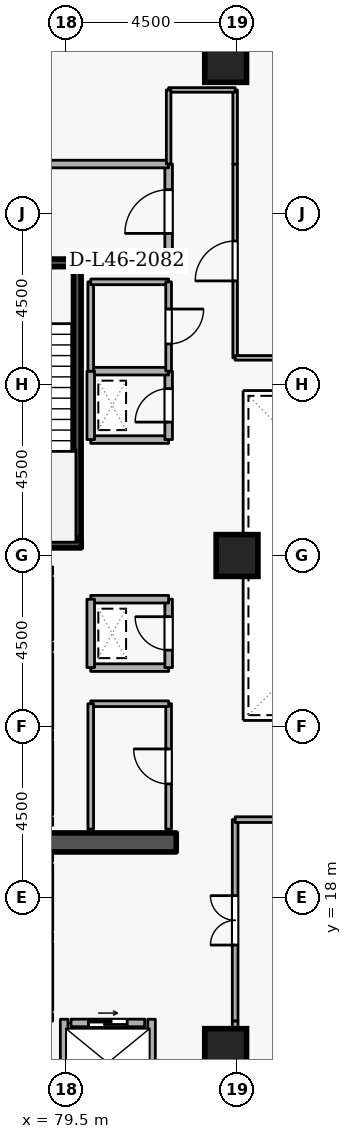
"""IFC4 building model, lengths in metres.
Left out: names, types, materials, properties, quantities, classifications, styles, units other than length and angle.
Written with IfcOpenShell. Run it as: python <this file> out.ifc"""

import sys

from ifc_helpers import new_model, si_unit, direction, frame, frame_2d, origin, origin_2d, place, context, subcontext, project, spatial, rectangle, extrude, element, fill, save


model = new_model("IFC4")
c1 = context("Model", 3, precision=1e-05, world=origin(), true_north=direction((0.0, 1.0)))
c2 = subcontext(c1, "Body", "Model", "MODEL_VIEW")
j1 = project(units=[si_unit("LENGTHUNIT", "METRE"), si_unit("PLANEANGLEUNIT", "RADIAN")], contexts=[c1])
p1 = place(None, origin())
s1 = spatial("IfcSite", under=j1, at=p1, CompositionType="ELEMENT")
p2 = place(p1, origin())
s2 = spatial("IfcBuilding", under=s1, at=p2, CompositionType="ELEMENT")
p3 = place(p2, frame((0.0, 0.0, 174.3)))
s3 = spatial("IfcBuildingStorey", under=s2, at=p3, CompositionType="ELEMENT", Elevation=174.3)
p4 = place(p3, frame((76.6, 19.45, 0.0), z_axis=(0.0, 0.0, 1.0), x_axis=(1.0, 0.0, 0.0)))
e1 = element("IfcWall", 1, at=p4, inside=s3, PredefinedType="SHEAR", context=c2, shape_type="SweptSolid", body=[
    extrude(rectangle(XDim=5.8, YDim=0.5, at=frame_2d((2.9, 0.0))), origin(), (0.0, 0.0, 1.0), 4.2),
])
for number, where, z_axis, x_axis in (
    (2, (83.7, 14.0, 0.0), (0.0, 0.0, 1.0), (1.0, 0.0, 0.0)),
    (3, (83.7, 40.0, 0.0), (0.0, 0.0, 1.0), (1.0, 0.0, 0.0)),
    (4, (84.0, 27.0, 0.0), (0.0, 0.0, 1.0), (1.0, 0.0, 0.0)),
):
    element("IfcColumn", number, at=place(p3, frame(where, z_axis=z_axis, x_axis=x_axis)), inside=s3, PredefinedType="COLUMN", context=c2, shape_type="SweptSolid", body=[
        extrude(rectangle(XDim=1.1, YDim=1.1, at=origin_2d()), origin(), (0.0, 0.0, 1.0), 4.2),
    ])
p5 = place(p3, frame((79.05, 24.78, 0.0), z_axis=(0.0, 0.0, 1.0), x_axis=(0.0, 1.0, 0.0)))
e5 = element("IfcWall", 5, at=p5, inside=s3, PredefinedType="STANDARD", context=c2, shape_type="SweptSolid", body=[
    extrude(rectangle(XDim=1.64, YDim=0.2, at=frame_2d((0.82, 0.0))), origin(), (0.0, 0.0, 1.0), 3.94),
])
p6 = place(p5, frame((0.31, 0.0, 0.0)))
e6 = element("IfcOpeningElement", 6, at=p6, cuts=e5, PredefinedType="OPENING", context=c2, shape_type="SweptSolid", body=[
    extrude(rectangle(XDim=1.02, YDim=2.06, at=frame_2d((0.51, 1.03))), frame((0.0, 0.11, 0.0), z_axis=(0.0, -1.0, 0.0), x_axis=(1.0, 0.0, 0.0)), (0.0, 0.0, 1.0), 0.22),
])
p7 = place(p3, frame((79.05, 22.43, 0.0), z_axis=(0.0, 0.0, 1.0), x_axis=(0.0, 1.0, 0.0)))
e7 = element("IfcWall", 7, at=p7, inside=s3, PredefinedType="STANDARD", context=c2, shape_type="SweptSolid", body=[
    extrude(rectangle(XDim=1.99, YDim=0.2, at=frame_2d((0.995, 0.0))), origin(), (0.0, 0.0, 1.0), 3.94),
])
p8 = place(p7, frame((0.485, 0.0, 0.0)))
e8 = element("IfcOpeningElement", 8, at=p8, cuts=e7, PredefinedType="OPENING", context=c2, shape_type="SweptSolid", body=[
    extrude(rectangle(XDim=1.02, YDim=2.06, at=frame_2d((0.51, 1.03))), frame((0.0, 0.11, 0.0), z_axis=(0.0, -1.0, 0.0), x_axis=(1.0, 0.0, 0.0)), (0.0, 0.0, 1.0), 0.22),
])
p9 = place(p3, frame((79.05, 20.18, 0.0), z_axis=(0.0, 0.0, 1.0), x_axis=(0.0, 1.0, 0.0)))
e9 = element("IfcWall", 9, at=p9, inside=s3, PredefinedType="STANDARD", context=c2, shape_type="SweptSolid", body=[
    extrude(rectangle(XDim=1.94, YDim=0.2, at=frame_2d((0.97, 0.0))), origin(), (0.0, 0.0, 1.0), 3.94),
])
p10 = place(p9, frame((0.46, 0.0, 0.0)))
e10 = element("IfcOpeningElement", 10, at=p10, cuts=e9, PredefinedType="OPENING", context=c2, shape_type="SweptSolid", body=[
    extrude(rectangle(XDim=1.02, YDim=2.06, at=frame_2d((0.51, 1.03))), frame((0.0, 0.11, 0.0), z_axis=(0.0, -1.0, 0.0), x_axis=(1.0, 0.0, 0.0)), (0.0, 0.0, 1.0), 0.22),
])
p11 = place(p3, frame((79.05, 17.13, 0.0), z_axis=(0.0, 0.0, 1.0), x_axis=(0.0, 1.0, 0.0)))
e11 = element("IfcWall", 11, at=p11, inside=s3, PredefinedType="STANDARD", context=c2, shape_type="SweptSolid", body=[
    extrude(rectangle(XDim=1.74, YDim=0.2, at=frame_2d((0.87, 0.0))), origin(), (0.0, 0.0, 1.0), 3.94),
])
p12 = place(p11, frame((0.36, 0.0, 0.0)))
e12 = element("IfcOpeningElement", 12, at=p12, cuts=e11, PredefinedType="OPENING", context=c2, shape_type="SweptSolid", body=[
    extrude(rectangle(XDim=1.02, YDim=2.06, at=frame_2d((0.51, 1.03))), frame((0.0, 0.11, 0.0), z_axis=(0.0, -1.0, 0.0), x_axis=(1.0, 0.0, 0.0)), (0.0, 0.0, 1.0), 0.22),
])
p13 = place(p3, frame((79.05, 15.03, 0.0), z_axis=(0.0, 0.0, 1.0), x_axis=(0.0, 1.0, 0.0)))
e13 = element("IfcWall", 13, at=p13, inside=s3, PredefinedType="STANDARD", context=c2, shape_type="SweptSolid", body=[
    extrude(rectangle(XDim=1.79, YDim=0.2, at=frame_2d((0.895, 0.0))), origin(), (0.0, 0.0, 1.0), 3.94),
])
p14 = place(p13, frame((0.385, 0.0, 0.0)))
e14 = element("IfcOpeningElement", 14, at=p14, cuts=e13, PredefinedType="OPENING", context=c2, shape_type="SweptSolid", body=[
    extrude(rectangle(XDim=1.02, YDim=2.06, at=frame_2d((0.51, 1.03))), frame((0.0, 0.11, 0.0), z_axis=(0.0, -1.0, 0.0), x_axis=(1.0, 0.0, 0.0)), (0.0, 0.0, 1.0), 0.22),
])
p15 = place(p3, frame((79.63, 14.7, 0.0), z_axis=(0.0, 0.0, 1.0), x_axis=(1.0, 0.0, 0.0)))
e15 = element("IfcWall", 15, at=p15, inside=s3, PredefinedType="STANDARD", context=c2, shape_type="SweptSolid", body=[
    extrude(rectangle(XDim=1.94, YDim=0.2, at=frame_2d((0.97, 0.0))), origin(), (0.0, 0.0, 1.0), 3.94),
])
p16 = place(p15, frame((0.46, 0.0, 0.0)))
e16 = element("IfcOpeningElement", 16, at=p16, cuts=e15, PredefinedType="OPENING", context=c2, shape_type="SweptSolid", body=[
    extrude(rectangle(XDim=1.02, YDim=2.06, at=frame_2d((0.51, 1.03))), frame((0.0, 0.11, 0.0), z_axis=(0.0, -1.0, 0.0), x_axis=(1.0, 0.0, 0.0)), (0.0, 0.0, 1.0), 0.22),
])
for number, where, z_axis, x_axis in (
    (17, (81.75, 12.612, 0.0), (0.0, 0.0, 1.0), (0.0, 1.0, 0.0)),
    (18, (79.45, 12.612, 0.0), (0.0, 0.0, 1.0), (0.0, 1.0, 0.0)),
):
    element("IfcWall", number, at=place(p3, frame(where, z_axis=z_axis, x_axis=x_axis)), inside=s3, PredefinedType="STANDARD", context=c2, shape_type="SweptSolid", body=[
        extrude(rectangle(XDim=2.186, YDim=0.2, at=frame_2d((1.093, 0.0))), origin(), (0.0, 0.0, 1.0), 3.94),
    ])
p17 = place(p3, frame((76.55, 34.7, 0.0), z_axis=(0.0, 0.0, 1.0), x_axis=(1.0, 0.0, 0.0)))
e19 = element("IfcWall", 19, at=p17, inside=s3, PredefinedType="SHEAR", context=c2, shape_type="SweptSolid", body=[
    extrude(rectangle(XDim=3.35, YDim=0.2, at=frame_2d((1.675, 0.0))), origin(), (0.0, 0.0, 1.0), 4.2),
])
p18 = place(p17, frame((1.125, 0.0, 0.0)))
e20 = element("IfcOpeningElement", 20, at=p18, cuts=e19, PredefinedType="OPENING", context=c2, shape_type="SweptSolid", body=[
    extrude(rectangle(XDim=1.1, YDim=2.1, at=frame_2d((0.55, 1.05))), frame((0.0, 0.11, 0.0), z_axis=(0.0, -1.0, 0.0), x_axis=(1.0, 0.0, 0.0)), (0.0, 0.0, 1.0), 0.22),
])
p19 = place(p3, frame((79.9, 27.3, 0.0), z_axis=(0.0, 0.0, 1.0), x_axis=(-1.0, 0.0, 0.0)))
e21 = element("IfcWall", 21, at=p19, inside=s3, PredefinedType="SHEAR", context=c2, shape_type="SweptSolid", body=[
    extrude(rectangle(XDim=3.35, YDim=0.2, at=frame_2d((1.675, 0.0))), origin(), (0.0, 0.0, 1.0), 4.2),
])
p20 = place(p3, frame((79.797, 27.45, 0.0), z_axis=(0.0, 0.0, 1.0), x_axis=(0.0, 1.0, 0.0)))
e22 = element("IfcWall", 22, at=p20, inside=s3, PredefinedType="SHEAR", context=c2, shape_type="SweptSolid", body=[
    extrude(rectangle(XDim=7.1, YDim=0.2, at=frame_2d((3.55, 0.0))), origin(), (0.0, 0.0, 1.0), 4.2),
])
p21 = place(p3, frame((79.9, 34.8, 0.0), z_axis=(0.0, 0.0, 1.0), x_axis=(1.0, 0.0, 0.0)))
e23 = element("IfcWall", 23, at=p21, inside=s3, PredefinedType="STANDARD", context=c2, shape_type="SweptSolid", body=[
    extrude(rectangle(XDim=2.3, YDim=0.2, at=frame_2d((1.15, 0.0))), origin(), (0.0, 0.0, 1.0), 3.145),
])
p22 = place(p3, frame((82.2, 34.8, 0.0), z_axis=(0.0, 0.0, 1.0), x_axis=(0.0, 1.0, 0.0)))
e24 = element("IfcWall", 24, at=p22, inside=s3, PredefinedType="STANDARD", context=c2, shape_type="SweptSolid", body=[
    extrude(rectangle(XDim=2.5, YDim=0.2, at=frame_2d((1.25, 0.0))), origin(), (0.0, 0.0, 1.0), 3.94),
])
p23 = place(p22, frame((0.675, 0.0, 0.0)))
e25 = element("IfcOpeningElement", 25, at=p23, cuts=e24, PredefinedType="OPENING", context=c2, shape_type="SweptSolid", body=[
    extrude(rectangle(XDim=1.15, YDim=2.1, at=frame_2d((0.575, 1.05))), frame((0.0, 0.11, 0.0), z_axis=(0.0, -1.0, 0.0), x_axis=(1.0, 0.0, 0.0)), (0.0, 0.0, 1.0), 0.22),
])
p24 = place(p3, frame((82.2, 37.3, 0.0), z_axis=(0.0, 0.0, 1.0), x_axis=(-1.0, 0.0, 0.0)))
e26 = element("IfcWall", 26, at=p24, inside=s3, PredefinedType="STANDARD", context=c2, shape_type="SweptSolid", body=[
    extrude(rectangle(XDim=5.7, YDim=0.2, at=frame_2d((2.85, 0.0))), origin(), (0.0, 0.0, 1.0), 3.94),
])
p25 = place(p3, frame((80.15, 24.05, 0.0), z_axis=(0.0, 0.0, 1.0), x_axis=(1.0, 0.0, 0.0)))
e27 = element("IfcWall", 27, at=p25, inside=s3, PredefinedType="STANDARD", context=c2, shape_type="SweptSolid", body=[
    extrude(rectangle(XDim=2.05, YDim=0.2, at=frame_2d((1.025, 0.0))), origin(), (0.0, 0.0, 1.0), 3.94),
])
p26 = place(p3, frame((82.2, 24.05, 0.0), z_axis=(0.0, 0.0, 1.0), x_axis=(0.0, 1.0, 0.0)))
e28 = element("IfcWall", 28, at=p26, inside=s3, PredefinedType="STANDARD", context=c2, shape_type="SweptSolid", body=[
    extrude(rectangle(XDim=1.8, YDim=0.2, at=frame_2d((0.9, 0.0))), origin(), (0.0, 0.0, 1.0), 3.94),
])
p27 = place(p26, frame((0.46, 0.0, 0.0)))
e29 = element("IfcOpeningElement", 29, at=p27, cuts=e28, PredefinedType="OPENING", context=c2, shape_type="SweptSolid", body=[
    extrude(rectangle(XDim=0.88, YDim=2.04, at=frame_2d((0.44, 1.02))), frame((0.0, 0.11, 0.0), z_axis=(0.0, -1.0, 0.0), x_axis=(1.0, 0.0, 0.0)), (0.0, 0.0, 1.0), 0.22),
])
p28 = place(p3, frame((82.2, 25.85, 0.0), z_axis=(0.0, 0.0, 1.0), x_axis=(-1.0, 0.0, 0.0)))
e30 = element("IfcWall", 30, at=p28, inside=s3, PredefinedType="STANDARD", context=c2, shape_type="SweptSolid", body=[
    extrude(rectangle(XDim=2.05, YDim=0.2, at=frame_2d((1.025, 0.0))), origin(), (0.0, 0.0, 1.0), 3.94),
])
p29 = place(p3, frame((80.15, 25.85, 0.0), z_axis=(0.0, 0.0, 1.0), x_axis=(0.0, -1.0, 0.0)))
e31 = element("IfcWall", 31, at=p29, inside=s3, PredefinedType="STANDARD", context=c2, shape_type="SweptSolid", body=[
    extrude(rectangle(XDim=1.8, YDim=0.2, at=frame_2d((0.9, 0.0))), origin(), (0.0, 0.0, 1.0), 3.94),
])
p30 = place(p3, frame((80.15, 30.05, 0.0), z_axis=(0.0, 0.0, 1.0), x_axis=(1.0, 0.0, 0.0)))
e32 = element("IfcWall", 32, at=p30, inside=s3, PredefinedType="STANDARD", context=c2, shape_type="SweptSolid", body=[
    extrude(rectangle(XDim=2.05, YDim=0.2, at=frame_2d((1.025, 0.0))), origin(), (0.0, 0.0, 1.0), 3.94),
])
p31 = place(p3, frame((82.2, 30.05, 0.0), z_axis=(0.0, 0.0, 1.0), x_axis=(0.0, 1.0, 0.0)))
e33 = element("IfcWall", 33, at=p31, inside=s3, PredefinedType="STANDARD", context=c2, shape_type="SweptSolid", body=[
    extrude(rectangle(XDim=1.8, YDim=0.2, at=frame_2d((0.9, 0.0))), origin(), (0.0, 0.0, 1.0), 3.94),
])
p32 = place(p31, frame((0.46, 0.0, 0.0)))
e34 = element("IfcOpeningElement", 34, at=p32, cuts=e33, PredefinedType="OPENING", context=c2, shape_type="SweptSolid", body=[
    extrude(rectangle(XDim=0.88, YDim=2.04, at=frame_2d((0.44, 1.02))), frame((0.0, 0.11, 0.0), z_axis=(0.0, -1.0, 0.0), x_axis=(1.0, 0.0, 0.0)), (0.0, 0.0, 1.0), 0.22),
])
p33 = place(p3, frame((82.2, 31.85, 0.0), z_axis=(0.0, 0.0, 1.0), x_axis=(-1.0, 0.0, 0.0)))
e35 = element("IfcWall", 35, at=p33, inside=s3, PredefinedType="STANDARD", context=c2, shape_type="SweptSolid", body=[
    extrude(rectangle(XDim=2.05, YDim=0.2, at=frame_2d((1.025, 0.0))), origin(), (0.0, 0.0, 1.0), 3.94),
])
p34 = place(p3, frame((80.15, 31.85, 0.0), z_axis=(0.0, 0.0, 1.0), x_axis=(0.0, -1.0, 0.0)))
e36 = element("IfcWall", 36, at=p34, inside=s3, PredefinedType="STANDARD", context=c2, shape_type="SweptSolid", body=[
    extrude(rectangle(XDim=1.8, YDim=0.2, at=frame_2d((0.9, 0.0))), origin(), (0.0, 0.0, 1.0), 3.94),
])
p35 = place(p3, frame((82.2, 19.8, 0.0), z_axis=(0.0, 0.0, 1.0), x_axis=(0.0, 1.0, 0.0)))
e37 = element("IfcWall", 37, at=p35, inside=s3, PredefinedType="PARTITIONING", context=c2, shape_type="SweptSolid", body=[
    extrude(rectangle(XDim=3.3, YDim=0.15, at=frame_2d((1.65, 0.0))), origin(), (0.0, 0.0, 1.0), 3.94),
])
p36 = place(p35, frame((1.19, 0.0, 0.0)))
e38 = element("IfcOpeningElement", 38, at=p36, cuts=e37, PredefinedType="OPENING", context=c2, shape_type="SweptSolid", body=[
    extrude(rectangle(XDim=0.92, YDim=2.08, at=frame_2d((0.46, 1.04))), frame((0.0, 0.085, 0.0), z_axis=(0.0, -1.0, 0.0), x_axis=(1.0, 0.0, 0.0)), (0.0, 0.0, 1.0), 0.17),
])
p37 = place(p3, frame((82.2, 23.1, 0.0), z_axis=(0.0, 0.0, 1.0), x_axis=(-1.0, 0.0, 0.0)))
e39 = element("IfcWall", 39, at=p37, inside=s3, PredefinedType="PARTITIONING", context=c2, shape_type="SweptSolid", body=[
    extrude(rectangle(XDim=2.05, YDim=0.15, at=frame_2d((1.025, 0.0))), origin(), (0.0, 0.0, 1.0), 3.94),
])
p38 = place(p3, frame((80.15, 23.1, 0.0), z_axis=(0.0, 0.0, 1.0), x_axis=(0.0, -1.0, 0.0)))
e40 = element("IfcWall", 40, at=p38, inside=s3, PredefinedType="PARTITIONING", context=c2, shape_type="SweptSolid", body=[
    extrude(rectangle(XDim=3.3, YDim=0.15, at=frame_2d((1.65, 0.0))), origin(), (0.0, 0.0, 1.0), 3.94),
])
p39 = place(p3, frame((80.15, 31.85, 0.0), z_axis=(0.0, 0.0, 1.0), x_axis=(0.0, 1.0, 0.0)))
e41 = element("IfcWall", 41, at=p39, inside=s3, PredefinedType="PARTITIONING", context=c2, shape_type="SweptSolid", body=[
    extrude(rectangle(XDim=2.35, YDim=0.15, at=frame_2d((1.175, 0.0))), origin(), (0.0, 0.0, 1.0), 3.94),
])
p40 = place(p3, frame((80.15, 34.2, 0.0), z_axis=(0.0, 0.0, 1.0), x_axis=(1.0, 0.0, 0.0)))
e42 = element("IfcWall", 42, at=p40, inside=s3, PredefinedType="PARTITIONING", context=c2, shape_type="SweptSolid", body=[
    extrude(rectangle(XDim=2.05, YDim=0.15, at=frame_2d((1.025, 0.0))), origin(), (0.0, 0.0, 1.0), 3.145),
])
p41 = place(p3, frame((82.2, 34.2, 0.0), z_axis=(0.0, 0.0, 1.0), x_axis=(0.0, -1.0, 0.0)))
e43 = element("IfcWall", 43, at=p41, inside=s3, PredefinedType="PARTITIONING", context=c2, shape_type="SweptSolid", body=[
    extrude(rectangle(XDim=2.35, YDim=0.15, at=frame_2d((1.175, 0.0))), origin(), (0.0, 0.0, 1.0), 3.94),
])
p42 = place(p41, frame((0.715, 0.0, 0.0)))
e44 = element("IfcOpeningElement", 44, at=p42, cuts=e43, PredefinedType="OPENING", context=c2, shape_type="SweptSolid", body=[
    extrude(rectangle(XDim=0.92, YDim=2.08, at=frame_2d((0.46, 1.04))), frame((0.0, 0.085, 0.0), z_axis=(0.0, -1.0, 0.0), x_axis=(1.0, 0.0, 0.0)), (0.0, 0.0, 1.0), 0.17),
])
p43 = place(p3, frame((83.95, 14.75, 0.0), z_axis=(0.0, 0.0, 1.0), x_axis=(0.0, 1.0, 0.0)))
e45 = element("IfcWall", 45, at=p43, inside=s3, PredefinedType="PARTITIONING", context=c2, shape_type="SweptSolid", body=[
    extrude(rectangle(XDim=5.3, YDim=0.15, at=frame_2d((2.65, 0.0))), origin(), (0.0, 0.0, 1.0), 3.94),
])
p44 = place(p43, frame((2.0, 0.0, 0.0)))
e46 = element("IfcOpeningElement", 46, at=p44, cuts=e45, PredefinedType="OPENING", context=c2, shape_type="SweptSolid", body=[
    extrude(rectangle(XDim=1.3, YDim=2.12, at=frame_2d((0.65, 1.06))), frame((0.0, 0.085, 0.0), z_axis=(0.0, -1.0, 0.0), x_axis=(1.0, 0.0, 0.0)), (0.0, 0.0, 1.0), 0.17),
])
p45 = place(p3, frame((83.95, 20.05, 0.0), z_axis=(0.0, 0.0, 1.0), x_axis=(1.0, 0.0, 0.0)))
e47 = element("IfcWall", 47, at=p45, inside=s3, PredefinedType="PARTITIONING", context=c2, shape_type="SweptSolid", body=[
    extrude(rectangle(XDim=4.55, YDim=0.15, at=frame_2d((2.275, 0.0))), origin(), (0.0, 0.0, 1.0), 3.94),
])
p46 = place(p3, frame((83.95, 12.4, 0.0), z_axis=(0.0, 0.0, 1.0), x_axis=(0.0, 1.0, 0.0)))
e48 = element("IfcWall", 48, at=p46, inside=s3, PredefinedType="PARTITIONING", context=c2, shape_type="SweptSolid", body=[
    extrude(rectangle(XDim=2.35, YDim=0.15, at=frame_2d((1.175, 0.0))), origin(), (0.0, 0.0, 1.0), 3.94),
])
p47 = place(p3, frame((83.95, 32.2, 0.0), z_axis=(0.0, 0.0, 1.0), x_axis=(0.0, 1.0, 0.0)))
e49 = element("IfcWall", 49, at=p47, inside=s3, PredefinedType="PARTITIONING", context=c2, shape_type="SweptSolid", body=[
    extrude(rectangle(XDim=5.1, YDim=0.12, at=frame_2d((2.55, 0.0))), origin(), (0.0, 0.0, 1.0), 3.94),
])
p48 = place(p47, frame((2.025, 0.0, 0.0)))
e50 = element("IfcOpeningElement", 50, at=p48, cuts=e49, PredefinedType="OPENING", context=c2, shape_type="SweptSolid", body=[
    extrude(rectangle(XDim=1.05, YDim=2.1, at=frame_2d((0.525, 1.05))), frame((0.0, 0.07, 0.0), z_axis=(0.0, -1.0, 0.0), x_axis=(1.0, 0.0, 0.0)), (0.0, 0.0, 1.0), 0.14),
])
p49 = place(p3, frame((83.95, 37.3, 0.0), z_axis=(0.0, 0.0, 1.0), x_axis=(0.0, 1.0, 0.0)))
e51 = element("IfcWall", 51, at=p49, inside=s3, PredefinedType="PARTITIONING", context=c2, shape_type="SweptSolid", body=[
    extrude(rectangle(XDim=1.95, YDim=0.12, at=frame_2d((0.975, 0.0))), origin(), (0.0, 0.0, 1.0), 3.94),
])
p50 = place(p3, frame((83.95, 39.25, 0.0), z_axis=(0.0, 0.0, 1.0), x_axis=(-1.0, 0.0, 0.0)))
e52 = element("IfcWall", 52, at=p50, inside=s3, PredefinedType="PARTITIONING", context=c2, shape_type="SweptSolid", body=[
    extrude(rectangle(XDim=1.75, YDim=0.12, at=frame_2d((0.875, 0.0))), origin(), (0.0, 0.0, 1.0), 3.94),
])
p51 = place(p3, frame((82.2, 39.25, 0.0), z_axis=(0.0, 0.0, 1.0), x_axis=(0.0, -1.0, 0.0)))
e53 = element("IfcWall", 53, at=p51, inside=s3, PredefinedType="PARTITIONING", context=c2, shape_type="SweptSolid", body=[
    extrude(rectangle(XDim=1.95, YDim=0.12, at=frame_2d((0.975, 0.0))), origin(), (0.0, 0.0, 1.0), 3.94),
])
p52 = place(p3, frame((88.5, 32.2, 0.0), z_axis=(0.0, 0.0, 1.0), x_axis=(-1.0, 0.0, 0.0)))
e54 = element("IfcWall", 54, at=p52, inside=s3, PredefinedType="PARTITIONING", context=c2, shape_type="SweptSolid", body=[
    extrude(rectangle(XDim=4.55, YDim=0.12, at=frame_2d((2.275, 0.0))), origin(), (0.0, 0.0, 1.0), 3.94),
])
p53 = place(p16, origin())
e55 = element("IfcDoor", 55, at=p53, inside=s3, OperationType="SLIDING_TO_LEFT", PredefinedType="DOOR", context=c2, shape_type="SweptSolid", body=[
    extrude(rectangle(XDim=1.02, YDim=2.06, at=frame_2d((0.51, 1.03))), frame((0.0, 0.025, 0.0), z_axis=(0.0, -1.0, 0.0), x_axis=(1.0, 0.0, 0.0)), (0.0, 0.0, 1.0), 0.05),
])
fill(e16, e55)
p54 = place(p23, origin())
e56 = element("IfcDoor", 56, at=p54, inside=s3, OperationType="SINGLE_SWING_LEFT", PredefinedType="DOOR", context=c2, shape_type="SweptSolid", body=[
    extrude(rectangle(XDim=1.15, YDim=2.1, at=frame_2d((0.575, 1.05))), frame((0.0, 0.025, 0.0), z_axis=(0.0, -1.0, 0.0), x_axis=(1.0, 0.0, 0.0)), (0.0, 0.0, 1.0), 0.05),
])
fill(e25, e56)
p55 = place(p27, origin())
e57 = element("IfcDoor", 57, at=p55, inside=s3, OperationType="SINGLE_SWING_RIGHT", PredefinedType="DOOR", context=c2, shape_type="SweptSolid", body=[
    extrude(rectangle(XDim=0.88, YDim=2.04, at=frame_2d((0.44, 1.02))), frame((0.0, 0.025, 0.0), z_axis=(0.0, -1.0, 0.0), x_axis=(1.0, 0.0, 0.0)), (0.0, 0.0, 1.0), 0.05),
])
fill(e29, e57)
p56 = place(p32, origin())
e58 = element("IfcDoor", 58, at=p56, inside=s3, OperationType="SINGLE_SWING_LEFT", PredefinedType="DOOR", context=c2, shape_type="SweptSolid", body=[
    extrude(rectangle(XDim=0.88, YDim=2.04, at=frame_2d((0.44, 1.02))), frame((0.0, 0.025, 0.0), z_axis=(0.0, -1.0, 0.0), x_axis=(1.0, 0.0, 0.0)), (0.0, 0.0, 1.0), 0.05),
])
fill(e34, e58)
p57 = place(p36, origin())
e59 = element("IfcDoor", 59, at=p57, inside=s3, OperationType="SINGLE_SWING_RIGHT", PredefinedType="DOOR", context=c2, shape_type="SweptSolid", body=[
    extrude(rectangle(XDim=0.92, YDim=2.08, at=frame_2d((0.46, 1.04))), frame((0.0, 0.025, 0.0), z_axis=(0.0, -1.0, 0.0), x_axis=(1.0, 0.0, 0.0)), (0.0, 0.0, 1.0), 0.05),
])
fill(e38, e59)
p58 = place(p42, origin())
e60 = element("IfcDoor", 60, at=p58, inside=s3, OperationType="SINGLE_SWING_LEFT", PredefinedType="DOOR", context=c2, shape_type="SweptSolid", body=[
    extrude(rectangle(XDim=0.92, YDim=2.08, at=frame_2d((0.46, 1.04))), frame((0.0, 0.025, 0.0), z_axis=(0.0, -1.0, 0.0), x_axis=(1.0, 0.0, 0.0)), (0.0, 0.0, 1.0), 0.05),
])
fill(e44, e60)
p59 = place(p44, origin())
e61 = element("IfcDoor", 61, at=p59, inside=s3, OperationType="DOUBLE_DOOR_SINGLE_SWING", PredefinedType="DOOR", context=c2, shape_type="SweptSolid", body=[
    extrude(rectangle(XDim=1.3, YDim=2.12, at=frame_2d((0.65, 1.06))), frame((0.0, 0.025, 0.0), z_axis=(0.0, -1.0, 0.0), x_axis=(1.0, 0.0, 0.0)), (0.0, 0.0, 1.0), 0.05),
])
fill(e46, e61)
p60 = place(p48, origin())
e62 = element("IfcDoor", 62, at=p60, inside=s3, OperationType="SINGLE_SWING_LEFT", PredefinedType="DOOR", context=c2, shape_type="SweptSolid", body=[
    extrude(rectangle(XDim=1.05, YDim=2.1, at=frame_2d((0.525, 1.05))), frame((0.0, 0.025, 0.0), z_axis=(0.0, -1.0, 0.0), x_axis=(1.0, 0.0, 0.0)), (0.0, 0.0, 1.0), 0.05),
])
fill(e50, e62)
save(model, sys.argv[1])
